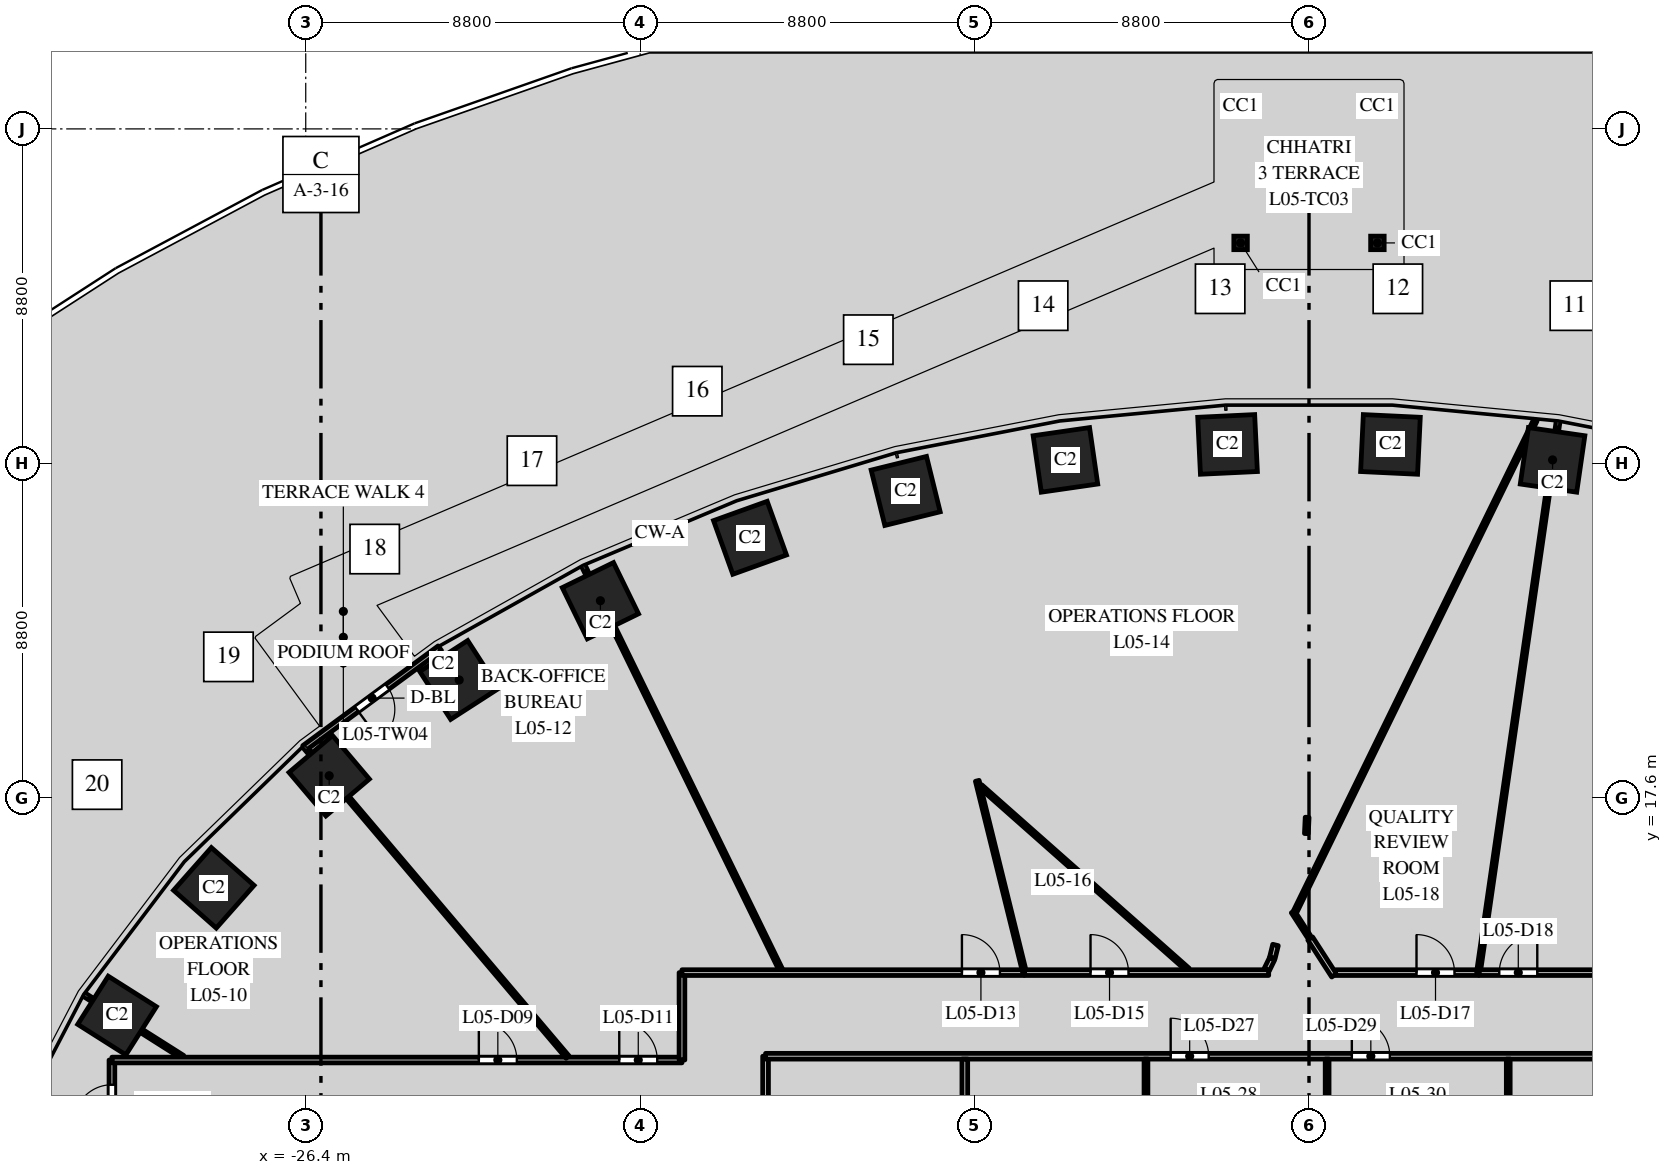
"""IFC4 building model, lengths in metres.
Left out: names, types, materials, properties, quantities, classifications, styles, units other than length and angle.
Written with IfcOpenShell. Run it as: python <this file> out.ifc"""

import sys

from ifc_helpers import new_model, si_unit, direction, frame, frame_2d, origin, origin_2d, place, context, subcontext, project, spatial, rectangle, hollow_circle, extrude, element, fill, save


model = new_model("IFC4")
c1 = context("Model", 3, precision=1e-05, world=origin(), true_north=direction((0.0, 1.0)))
c2 = subcontext(c1, "Body", "Model", "MODEL_VIEW")
j1 = project(units=[si_unit("LENGTHUNIT", "METRE"), si_unit("PLANEANGLEUNIT", "RADIAN")], contexts=[c1])
p1 = place(None, origin())
s1 = spatial("IfcSite", under=j1, at=p1, CompositionType="ELEMENT")
p2 = place(p1, origin())
s2 = spatial("IfcBuilding", under=s1, at=p2, CompositionType="ELEMENT")
p3 = place(p2, frame((0.0, 0.0, 30.5)))
s3 = spatial("IfcBuildingStorey", under=s2, at=p3, CompositionType="ELEMENT", Elevation=30.5)
for number, where, z_axis, x_axis in (
    (1, (6.409, 26.491, 0.0), (0.0, 0.0, 1.0), (-0.99, 0.143, 0.0)),
    (2, (2.143, 26.898, 0.0), (0.0, 0.0, 1.0), (-0.999, 0.048, 0.0)),
    (3, (-2.143, 26.898, 0.0), (0.0, 0.0, 1.0), (-0.999, -0.048, 0.0)),
    (4, (-6.409, 26.491, 0.0), (0.0, 0.0, 1.0), (-0.99, -0.143, 0.0)),
    (5, (-10.613, 25.674, 0.0), (0.0, 0.0, 1.0), (-0.971, -0.24, 0.0)),
    (6, (-14.709, 24.441, 0.0), (0.0, 0.0, 1.0), (-0.941, -0.338, 0.0)),
    (7, (-18.646, 22.785, 0.0), (0.0, 0.0, 1.0), (-0.898, -0.439, 0.0)),
    (8, (-22.362, 20.7, 0.0), (0.0, 0.0, 1.0), (-0.84, -0.542, 0.0)),
    (9, (-25.783, 18.18, 0.0), (0.0, 0.0, 1.0), (-0.763, -0.646, 0.0)),
    (10, (-28.819, 15.23, 0.0), (0.0, 0.0, 1.0), (-0.663, -0.749, 0.0)),
    (11, (-31.365, 11.871, 0.0), (0.0, 0.0, 1.0), (-0.535, -0.845, 0.0)),
):
    element("IfcColumn", number, at=place(p3, frame(where, z_axis=z_axis, x_axis=x_axis)), inside=s3, PredefinedType="COLUMN", context=c2, shape_type="SweptSolid", body=[
        extrude(rectangle(XDim=1.5, YDim=1.5, at=origin_2d()), origin(), (0.0, 0.0, 1.0), 4.0),
    ])
p4 = place(p3, frame((-22.872, 21.535, 0.0), z_axis=(0.0, 0.0, 1.0), x_axis=(-0.805154287598, -0.593065403782, 0.0)))
e12 = element("IfcWall", 12, at=p4, inside=s3, PredefinedType="STANDARD", context=c2, shape_type="SweptSolid", body=[
    extrude(rectangle(XDim=4.425, YDim=0.15, at=frame_2d((2.212, 0.0))), origin(), (0.0, 0.0, 1.0), 3.7),
])
p5 = place(p4, frame((1.712, 0.0, 0.0)))
e13 = element("IfcOpeningElement", 13, at=p5, cuts=e12, PredefinedType="OPENING", context=c2, shape_type="SweptSolid", body=[
    extrude(rectangle(XDim=1.0, YDim=2.4, at=frame_2d((0.5, 1.2))), frame((0.0, 0.085, 0.0), z_axis=(0.0, -1.0, 0.0), x_axis=(1.0, 0.0, 0.0)), (0.0, 0.0, 1.0), 0.17),
])
for number, where, z_axis, x_axis in (
    (14, (-1.8, 32.2, 0.45), (0.0, 0.0, 1.0), (1.0, 0.0, 0.0)),
    (15, (1.8, 32.2, 0.45), (0.0, 0.0, 1.0), (1.0, 0.0, 0.0)),
    (16, (1.8, 35.8, 0.45), (0.0, 0.0, 1.0), (1.0, 0.0, 0.0)),
    (17, (-1.8, 35.8, 0.45), (0.0, 0.0, 1.0), (1.0, 0.0, 0.0)),
):
    element("IfcColumn", number, at=place(p3, frame(where, z_axis=z_axis, x_axis=x_axis)), inside=s3, PredefinedType="COLUMN", context=c2, shape_type="SweptSolid", body=[
        extrude(hollow_circle(Radius=0.178, WallThickness=0.016, at=origin_2d()), origin(), (0.0, 0.0, 1.0), 3.55),
    ])
p6 = place(p3, frame((-32.212, 12.408, 0.0), z_axis=(0.0, 0.0, 1.0), x_axis=(0.844810627195, -0.535065420467, 0.0)))
e18 = element("IfcWall", 18, at=p6, inside=s3, PredefinedType="PARTITIONING", context=c2, shape_type="SweptSolid", body=[
    extrude(rectangle(XDim=3.048, YDim=0.1, at=frame_2d((1.524, 0.0))), origin(), (0.0, 0.0, 1.0), 3.7),
])
p7 = place(p3, frame((-31.5, 8.5, 0.0), z_axis=(0.0, 0.0, 1.0), x_axis=(0.0, 1.0, 0.0)))
e19 = element("IfcWall", 19, at=p7, inside=s3, PredefinedType="PARTITIONING", context=c2, shape_type="SweptSolid", body=[
    extrude(rectangle(XDim=2.2, YDim=0.15, at=frame_2d((1.1, 0.0))), origin(), (0.0, 0.0, 1.0), 3.7),
])
p8 = place(p7, frame((0.55, 0.0, 0.0)))
e20 = element("IfcOpeningElement", 20, at=p8, cuts=e19, PredefinedType="OPENING", context=c2, shape_type="SweptSolid", body=[
    extrude(rectangle(XDim=1.0, YDim=2.1, at=frame_2d((0.5, 1.05))), frame((0.0, 0.085, 0.0), z_axis=(0.0, -1.0, 0.0), x_axis=(1.0, 0.0, 0.0)), (0.0, 0.0, 1.0), 0.17),
])
p9 = place(p3, frame((-31.5, 10.7, 0.0), z_axis=(0.0, 0.0, 1.0), x_axis=(1.0, 0.0, 0.0)))
e21 = element("IfcWall", 21, at=p9, inside=s3, PredefinedType="PARTITIONING", context=c2, shape_type="SweptSolid", body=[
    extrude(rectangle(XDim=15.0, YDim=0.15, at=frame_2d((7.5, 0.0))), origin(), (0.0, 0.0, 1.0), 3.1),
])
p10 = place(p9, frame((9.655, 0.0, 0.0)))
e22 = element("IfcOpeningElement", 22, at=p10, cuts=e21, PredefinedType="OPENING", context=c2, shape_type="SweptSolid", body=[
    extrude(rectangle(XDim=1.0, YDim=2.1, at=frame_2d((0.5, 1.05))), frame((0.0, 0.085, 0.0), z_axis=(0.0, -1.0, 0.0), x_axis=(1.0, 0.0, 0.0)), (0.0, 0.0, 1.0), 0.17),
])
p11 = place(p9, frame((13.35, 0.0, 0.0)))
e23 = element("IfcOpeningElement", 23, at=p11, cuts=e21, PredefinedType="OPENING", context=c2, shape_type="SweptSolid", body=[
    extrude(rectangle(XDim=1.0, YDim=2.1, at=frame_2d((0.5, 1.05))), frame((0.0, 0.085, 0.0), z_axis=(0.0, -1.0, 0.0), x_axis=(1.0, 0.0, 0.0)), (0.0, 0.0, 1.0), 0.17),
])
p12 = place(p3, frame((-26.43, 18.945, 0.0), z_axis=(0.0, 0.0, 1.0), x_axis=(0.646400187952, -0.762998556365, 0.0)))
e24 = element("IfcWall", 24, at=p12, inside=s3, PredefinedType="PARTITIONING", context=c2, shape_type="SweptSolid", body=[
    extrude(rectangle(XDim=10.704, YDim=0.1, at=frame_2d((5.352, 0.0))), origin(), (0.0, 0.0, 1.0), 3.7),
])
p13 = place(p3, frame((-19.086, 23.685, 0.0), z_axis=(0.0, 0.0, 1.0), x_axis=(0.439199750603, -0.898389436197, 0.0)))
e25 = element("IfcWall", 25, at=p13, inside=s3, PredefinedType="PARTITIONING", context=c2, shape_type="SweptSolid", body=[
    extrude(rectangle(XDim=11.81, YDim=0.1, at=frame_2d((5.905, 0.0))), origin(), (0.0, 0.0, 1.0), 3.7),
])
p14 = place(p3, frame((-16.5, 10.7, 0.0), z_axis=(0.0, 0.0, 1.0), x_axis=(0.0, 1.0, 0.0)))
e26 = element("IfcWall", 26, at=p14, inside=s3, PredefinedType="PARTITIONING", context=c2, shape_type="SweptSolid", body=[
    extrude(rectangle(XDim=2.3, YDim=0.15, at=frame_2d((1.15, 0.0))), origin(), (0.0, 0.0, 1.0), 2.75),
])
p15 = place(p3, frame((-16.5, 13.0, 0.0), z_axis=(0.0, 0.0, 1.0), x_axis=(1.0, 0.0, 0.0)))
e27 = element("IfcWall", 27, at=p15, inside=s3, PredefinedType="PARTITIONING", context=c2, shape_type="SweptSolid", body=[
    extrude(rectangle(XDim=9.001, YDim=0.15, at=frame_2d((4.5, 0.0))), origin(), (0.0, 0.0, 1.0), 2.85),
])
p16 = place(p15, frame((7.367, 0.0, 0.0)))
e28 = element("IfcOpeningElement", 28, at=p16, cuts=e27, PredefinedType="OPENING", context=c2, shape_type="SweptSolid", body=[
    extrude(rectangle(XDim=1.0, YDim=2.1, at=frame_2d((0.5, 1.05))), frame((0.0, 0.085, 0.0), z_axis=(0.0, -1.0, 0.0), x_axis=(1.0, 0.0, 0.0)), (0.0, 0.0, 1.0), 0.17),
])
p17 = place(p3, frame((-14.3, -10.8, 0.0), z_axis=(0.0, 0.0, 1.0), x_axis=(0.0, 1.0, 0.0)))
e29 = element("IfcWall", 29, at=p17, inside=s3, PredefinedType="PARTITIONING", context=c2, shape_type="SweptSolid", body=[
    extrude(rectangle(XDim=21.6, YDim=0.15, at=frame_2d((10.8, 0.0))), origin(), (0.0, 0.0, 1.0), 2.75),
])
p18 = place(p17, frame((0.65, 0.0, 0.0)))
e30 = element("IfcOpeningElement", 30, at=p18, cuts=e29, PredefinedType="OPENING", context=c2, shape_type="SweptSolid", body=[
    extrude(rectangle(XDim=1.0, YDim=2.1, at=frame_2d((0.5, 1.05))), frame((0.0, 0.085, 0.0), z_axis=(0.0, -1.0, 0.0), x_axis=(1.0, 0.0, 0.0)), (0.0, 0.0, 1.0), 0.17),
])
p19 = place(p3, frame((-14.3, 10.8, 0.0), z_axis=(0.0, 0.0, 1.0), x_axis=(1.0, 0.0, 0.0)))
e31 = element("IfcWall", 31, at=p19, inside=s3, PredefinedType="PARTITIONING", context=c2, shape_type="SweptSolid", body=[
    extrude(rectangle(XDim=28.6, YDim=0.15, at=frame_2d((14.3, 0.0))), origin(), (0.0, 0.0, 1.0), 2.85),
])
p20 = place(p19, frame((10.66, 0.0, 0.0)))
e32 = element("IfcOpeningElement", 32, at=p20, cuts=e31, PredefinedType="OPENING", context=c2, shape_type="SweptSolid", body=[
    extrude(rectangle(XDim=1.0, YDim=2.1, at=frame_2d((0.5, 1.05))), frame((0.0, 0.085, 0.0), z_axis=(0.0, -1.0, 0.0), x_axis=(1.0, 0.0, 0.0)), (0.0, 0.0, 1.0), 0.17),
])
p21 = place(p19, frame((15.427, 0.0, 0.0)))
e33 = element("IfcOpeningElement", 33, at=p21, cuts=e31, PredefinedType="OPENING", context=c2, shape_type="SweptSolid", body=[
    extrude(rectangle(XDim=1.0, YDim=2.1, at=frame_2d((0.5, 1.05))), frame((0.0, 0.085, 0.0), z_axis=(0.0, -1.0, 0.0), x_axis=(1.0, 0.0, 0.0)), (0.0, 0.0, 1.0), 0.17),
])
p22 = place(p19, frame((22.693, 0.0, 0.0)))
e34 = element("IfcOpeningElement", 34, at=p22, cuts=e31, PredefinedType="OPENING", context=c2, shape_type="SweptSolid", body=[
    extrude(rectangle(XDim=1.0, YDim=2.1, at=frame_2d((0.5, 1.05))), frame((0.0, 0.085, 0.0), z_axis=(0.0, -1.0, 0.0), x_axis=(1.0, 0.0, 0.0)), (0.0, 0.0, 1.0), 0.17),
])
p23 = place(p3, frame((-9.057, 0.045, 0.0), z_axis=(0.0, 0.0, 1.0), x_axis=(0.0, 1.0, 0.0)))
e35 = element("IfcWall", 35, at=p23, inside=s3, PredefinedType="PARTITIONING", context=c2, shape_type="SweptSolid", body=[
    extrude(rectangle(XDim=10.68, YDim=0.15, at=frame_2d((5.34, 0.0))), origin(), (0.0, 0.0, 1.0), 2.75),
])
p24 = place(p23, frame((4.61, 0.0, 0.0)))
e36 = element("IfcOpeningElement", 36, at=p24, cuts=e35, PredefinedType="OPENING", context=c2, shape_type="SweptSolid", body=[
    extrude(rectangle(XDim=1.0, YDim=2.1, at=frame_2d((0.5, 1.05))), frame((0.0, 0.085, 0.0), z_axis=(0.0, -1.0, 0.0), x_axis=(1.0, 0.0, 0.0)), (0.0, 0.0, 1.0), 0.17),
])
p25 = place(p3, frame((-8.729, 18.046, 0.0), z_axis=(0.0, 0.0, 1.0), x_axis=(0.239749411988, -0.970834805439, 0.0)))
e37 = element("IfcWall", 37, at=p25, inside=s3, PredefinedType="PARTITIONING", context=c2, shape_type="SweptSolid", body=[
    extrude(rectangle(XDim=5.198, YDim=0.1, at=frame_2d((2.599, 0.0))), origin(), (0.0, 0.0, 1.0), 3.7),
])
p26 = place(p3, frame((-8.642, 17.903, 0.0), z_axis=(0.0, 0.0, 1.0), x_axis=(0.749027274438, -0.662539162728, 0.0)))
e38 = element("IfcWall", 38, at=p26, inside=s3, PredefinedType="PARTITIONING", context=c2, shape_type="SweptSolid", body=[
    extrude(rectangle(XDim=7.283, YDim=0.1, at=frame_2d((3.642, 0.0))), origin(), (0.0, 0.0, 1.0), 2.85),
])
p27 = place(p3, frame((-7.483, 13.0, 0.0), z_axis=(0.0, 0.0, 1.0), x_axis=(1.0, 0.0, 0.0)))
e39 = element("IfcWall", 39, at=p27, inside=s3, PredefinedType="PARTITIONING", context=c2, shape_type="SweptSolid", body=[
    extrude(rectangle(XDim=6.422, YDim=0.15, at=frame_2d((3.211, 0.0))), origin(), (0.0, 0.0, 1.0), 2.85),
])
p28 = place(p27, frame((1.734, 0.0, 0.0)))
e40 = element("IfcOpeningElement", 40, at=p28, cuts=e39, PredefinedType="OPENING", context=c2, shape_type="SweptSolid", body=[
    extrude(rectangle(XDim=1.0, YDim=2.1, at=frame_2d((0.5, 1.05))), frame((0.0, 0.085, 0.0), z_axis=(0.0, -1.0, 0.0), x_axis=(1.0, 0.0, 0.0)), (0.0, 0.0, 1.0), 0.17),
])
p29 = place(p3, frame((-4.29, 6.568, 0.0), z_axis=(0.0, 0.0, 1.0), x_axis=(0.0, 1.0, 0.0)))
e41 = element("IfcWall", 41, at=p29, inside=s3, PredefinedType="PARTITIONING", context=c2, shape_type="SweptSolid", body=[
    extrude(rectangle(XDim=4.157, YDim=0.1, at=frame_2d((2.079, 0.0))), origin(), (0.0, 0.0, 1.0), 2.85),
])
p30 = place(p3, frame((-1.111, 13.079, 0.0), z_axis=(0.0, 0.0, 1.0), x_axis=(0.440240923942, 0.897879685084, 0.0)))
e42 = element("IfcWall", 42, at=p30, inside=s3, PredefinedType="PARTITIONING", context=c2, shape_type="SweptSolid", body=[
    extrude(rectangle(XDim=0.323, YDim=0.15, at=frame_2d((0.161, 0.0))), origin(), (0.0, 0.0, 1.0), 2.85),
])
p31 = place(p3, frame((-0.965, 13.386, 0.0), z_axis=(0.0, 0.0, 1.0), x_axis=(0.239099704585, 0.970995021237, 0.0)))
e43 = element("IfcWall", 43, at=p31, inside=s3, PredefinedType="PARTITIONING", context=c2, shape_type="SweptSolid", body=[
    extrude(rectangle(XDim=0.351, YDim=0.15, at=frame_2d((0.176, 0.0))), origin(), (0.0, 0.0, 1.0), 2.85),
])
p32 = place(p3, frame((-0.423, 14.602, 0.0), z_axis=(0.0, 0.0, 1.0), x_axis=(0.542329359592, -0.840165975105, 0.0)))
e44 = element("IfcWall", 44, at=p32, inside=s3, PredefinedType="PARTITIONING", context=c2, shape_type="SweptSolid", body=[
    extrude(rectangle(XDim=0.769, YDim=0.1, at=frame_2d((0.384, 0.0))), origin(), (0.0, 0.0, 1.0), 3.7),
])
p33 = place(p3, frame((-0.365, 14.605, 0.0), z_axis=(0.0, 0.0, 1.0), x_axis=(0.439218344443, 0.898380345903, 0.0)))
e45 = element("IfcWall", 45, at=p33, inside=s3, PredefinedType="PARTITIONING", context=c2, shape_type="SweptSolid", body=[
    extrude(rectangle(XDim=14.396, YDim=0.1, at=frame_2d((7.198, 0.0))), origin(), (0.0, 0.0, 1.0), 2.85),
])
p34 = place(p3, frame((-0.069, 16.658, 0.0), z_axis=(0.0, 0.0, 1.0), x_axis=(0.046725861685, 0.99890775042, 0.0)))
e46 = element("IfcWall", 46, at=p34, inside=s3, PredefinedType="PARTITIONING", context=c2, shape_type="SweptSolid", body=[
    extrude(rectangle(XDim=0.428, YDim=0.1, at=frame_2d((0.214, 0.0))), origin(), (0.0, 0.0, 1.0), 3.7),
])
p35 = place(p3, frame((0.032, 13.898, 0.0), z_axis=(0.0, 0.0, 1.0), x_axis=(0.542280536951, -0.840197488239, 0.0)))
e47 = element("IfcWall", 47, at=p35, inside=s3, PredefinedType="PARTITIONING", context=c2, shape_type="SweptSolid", body=[
    extrude(rectangle(XDim=1.158, YDim=0.15, at=frame_2d((0.579, 0.0))), origin(), (0.0, 0.0, 1.0), 3.7),
])
p36 = place(p3, frame((0.477, 7.468, 0.0), z_axis=(0.0, 0.0, 1.0), x_axis=(0.0, 1.0, 0.0)))
e48 = element("IfcWall", 48, at=p36, inside=s3, PredefinedType="PARTITIONING", context=c2, shape_type="SweptSolid", body=[
    extrude(rectangle(XDim=3.257, YDim=0.1, at=frame_2d((1.628, 0.0))), origin(), (0.0, 0.0, 1.0), 2.85),
])
p37 = place(p3, frame((0.701, 13.0, 0.0), z_axis=(0.0, 0.0, 1.0), x_axis=(1.0, 0.0, 0.0)))
e49 = element("IfcWall", 49, at=p37, inside=s3, PredefinedType="PARTITIONING", context=c2, shape_type="SweptSolid", body=[
    extrude(rectangle(XDim=3.758, YDim=0.15, at=frame_2d((1.879, 0.0))), origin(), (0.0, 0.0, 1.0), 2.85),
])
p38 = place(p37, frame((2.128, 0.0, 0.0)))
e50 = element("IfcOpeningElement", 50, at=p38, cuts=e49, PredefinedType="OPENING", context=c2, shape_type="SweptSolid", body=[
    extrude(rectangle(XDim=1.0, YDim=2.1, at=frame_2d((0.5, 1.05))), frame((0.0, 0.085, 0.0), z_axis=(0.0, -1.0, 0.0), x_axis=(1.0, 0.0, 0.0)), (0.0, 0.0, 1.0), 0.17),
])
p39 = place(p3, frame((4.459, 13.004, 0.0), z_axis=(0.0, 0.0, 1.0), x_axis=(0.143087196312, 0.98971008596, 0.0)))
e51 = element("IfcWall", 51, at=p39, inside=s3, PredefinedType="PARTITIONING", context=c2, shape_type="SweptSolid", body=[
    extrude(rectangle(XDim=14.628, YDim=0.1, at=frame_2d((7.314, 0.0))), origin(), (0.0, 0.0, 1.0), 2.85),
])
p40 = place(p3, frame((4.479, 13.0, 0.0), z_axis=(0.0, 0.0, 1.0), x_axis=(1.0, 0.0, 0.0)))
e52 = element("IfcWall", 52, at=p40, inside=s3, PredefinedType="PARTITIONING", context=c2, shape_type="SweptSolid", body=[
    extrude(rectangle(XDim=3.568, YDim=0.15, at=frame_2d((1.784, 0.0))), origin(), (0.0, 0.0, 1.0), 2.85),
])
p41 = place(p40, frame((0.528, 0.0, 0.0)))
e53 = element("IfcOpeningElement", 53, at=p41, cuts=e52, PredefinedType="OPENING", context=c2, shape_type="SweptSolid", body=[
    extrude(rectangle(XDim=1.0, YDim=2.1, at=frame_2d((0.5, 1.05))), frame((0.0, 0.085, 0.0), z_axis=(0.0, -1.0, 0.0), x_axis=(1.0, 0.0, 0.0)), (0.0, 0.0, 1.0), 0.17),
])
p42 = place(p3, frame((5.243, 6.059, 0.0), z_axis=(0.0, 0.0, 1.0), x_axis=(0.0, 1.0, 0.0)))
e54 = element("IfcWall", 54, at=p42, inside=s3, PredefinedType="PARTITIONING", context=c2, shape_type="SweptSolid", body=[
    extrude(rectangle(XDim=4.666, YDim=0.1, at=frame_2d((2.333, 0.0))), origin(), (0.0, 0.0, 1.0), 2.85),
])
p43 = place(p5, origin())
e55 = element("IfcDoor", 55, at=p43, inside=s3, OperationType="SINGLE_SWING_RIGHT", PredefinedType="DOOR", context=c2, shape_type="SweptSolid", body=[
    extrude(rectangle(XDim=1.0, YDim=2.4, at=frame_2d((0.5, 1.2))), frame((0.0, 0.025, 0.0), z_axis=(0.0, -1.0, 0.0), x_axis=(1.0, 0.0, 0.0)), (0.0, 0.0, 1.0), 0.05),
])
fill(e13, e55)
p44 = place(p8, origin())
e56 = element("IfcDoor", 56, at=p44, inside=s3, OperationType="SINGLE_SWING_LEFT", PredefinedType="DOOR", context=c2, shape_type="SweptSolid", body=[
    extrude(rectangle(XDim=1.0, YDim=2.1, at=frame_2d((0.5, 1.05))), frame((0.0, 0.025, 0.0), z_axis=(0.0, -1.0, 0.0), x_axis=(1.0, 0.0, 0.0)), (0.0, 0.0, 1.0), 0.05),
])
fill(e20, e56)
p45 = place(p10, origin())
e57 = element("IfcDoor", 57, at=p45, inside=s3, OperationType="SINGLE_SWING_LEFT", PredefinedType="DOOR", context=c2, shape_type="SweptSolid", body=[
    extrude(rectangle(XDim=1.0, YDim=2.1, at=frame_2d((0.5, 1.05))), frame((0.0, 0.025, 0.0), z_axis=(0.0, -1.0, 0.0), x_axis=(1.0, 0.0, 0.0)), (0.0, 0.0, 1.0), 0.05),
])
fill(e22, e57)
p46 = place(p11, origin())
e58 = element("IfcDoor", 58, at=p46, inside=s3, OperationType="SINGLE_SWING_LEFT", PredefinedType="DOOR", context=c2, shape_type="SweptSolid", body=[
    extrude(rectangle(XDim=1.0, YDim=2.1, at=frame_2d((0.5, 1.05))), frame((0.0, 0.025, 0.0), z_axis=(0.0, -1.0, 0.0), x_axis=(1.0, 0.0, 0.0)), (0.0, 0.0, 1.0), 0.05),
])
fill(e23, e58)
p47 = place(p16, origin())
e59 = element("IfcDoor", 59, at=p47, inside=s3, OperationType="SINGLE_SWING_LEFT", PredefinedType="DOOR", context=c2, shape_type="SweptSolid", body=[
    extrude(rectangle(XDim=1.0, YDim=2.1, at=frame_2d((0.5, 1.05))), frame((0.0, 0.025, 0.0), z_axis=(0.0, -1.0, 0.0), x_axis=(1.0, 0.0, 0.0)), (0.0, 0.0, 1.0), 0.05),
])
fill(e28, e59)
p48 = place(p28, origin())
e60 = element("IfcDoor", 60, at=p48, inside=s3, OperationType="SINGLE_SWING_LEFT", PredefinedType="DOOR", context=c2, shape_type="SweptSolid", body=[
    extrude(rectangle(XDim=1.0, YDim=2.1, at=frame_2d((0.5, 1.05))), frame((0.0, 0.025, 0.0), z_axis=(0.0, -1.0, 0.0), x_axis=(1.0, 0.0, 0.0)), (0.0, 0.0, 1.0), 0.05),
])
fill(e40, e60)
p49 = place(p38, origin())
e61 = element("IfcDoor", 61, at=p49, inside=s3, OperationType="SINGLE_SWING_LEFT", PredefinedType="DOOR", context=c2, shape_type="SweptSolid", body=[
    extrude(rectangle(XDim=1.0, YDim=2.1, at=frame_2d((0.5, 1.05))), frame((0.0, 0.025, 0.0), z_axis=(0.0, -1.0, 0.0), x_axis=(1.0, 0.0, 0.0)), (0.0, 0.0, 1.0), 0.05),
])
fill(e50, e61)
p50 = place(p41, origin())
e62 = element("IfcDoor", 62, at=p50, inside=s3, OperationType="SINGLE_SWING_RIGHT", PredefinedType="DOOR", context=c2, shape_type="SweptSolid", body=[
    extrude(rectangle(XDim=1.0, YDim=2.1, at=frame_2d((0.5, 1.05))), frame((0.0, 0.025, 0.0), z_axis=(0.0, -1.0, 0.0), x_axis=(1.0, 0.0, 0.0)), (0.0, 0.0, 1.0), 0.05),
])
fill(e53, e62)
p51 = place(p20, origin())
e63 = element("IfcDoor", 63, at=p51, inside=s3, OperationType="SINGLE_SWING_LEFT", PredefinedType="DOOR", context=c2, shape_type="SweptSolid", body=[
    extrude(rectangle(XDim=1.0, YDim=2.1, at=frame_2d((0.5, 1.05))), frame((0.0, 0.025, 0.0), z_axis=(0.0, -1.0, 0.0), x_axis=(1.0, 0.0, 0.0)), (0.0, 0.0, 1.0), 0.05),
])
fill(e32, e63)
p52 = place(p21, origin())
e64 = element("IfcDoor", 64, at=p52, inside=s3, OperationType="SINGLE_SWING_LEFT", PredefinedType="DOOR", context=c2, shape_type="SweptSolid", body=[
    extrude(rectangle(XDim=1.0, YDim=2.1, at=frame_2d((0.5, 1.05))), frame((0.0, 0.025, 0.0), z_axis=(0.0, -1.0, 0.0), x_axis=(1.0, 0.0, 0.0)), (0.0, 0.0, 1.0), 0.05),
])
fill(e33, e64)
save(model, sys.argv[1])
